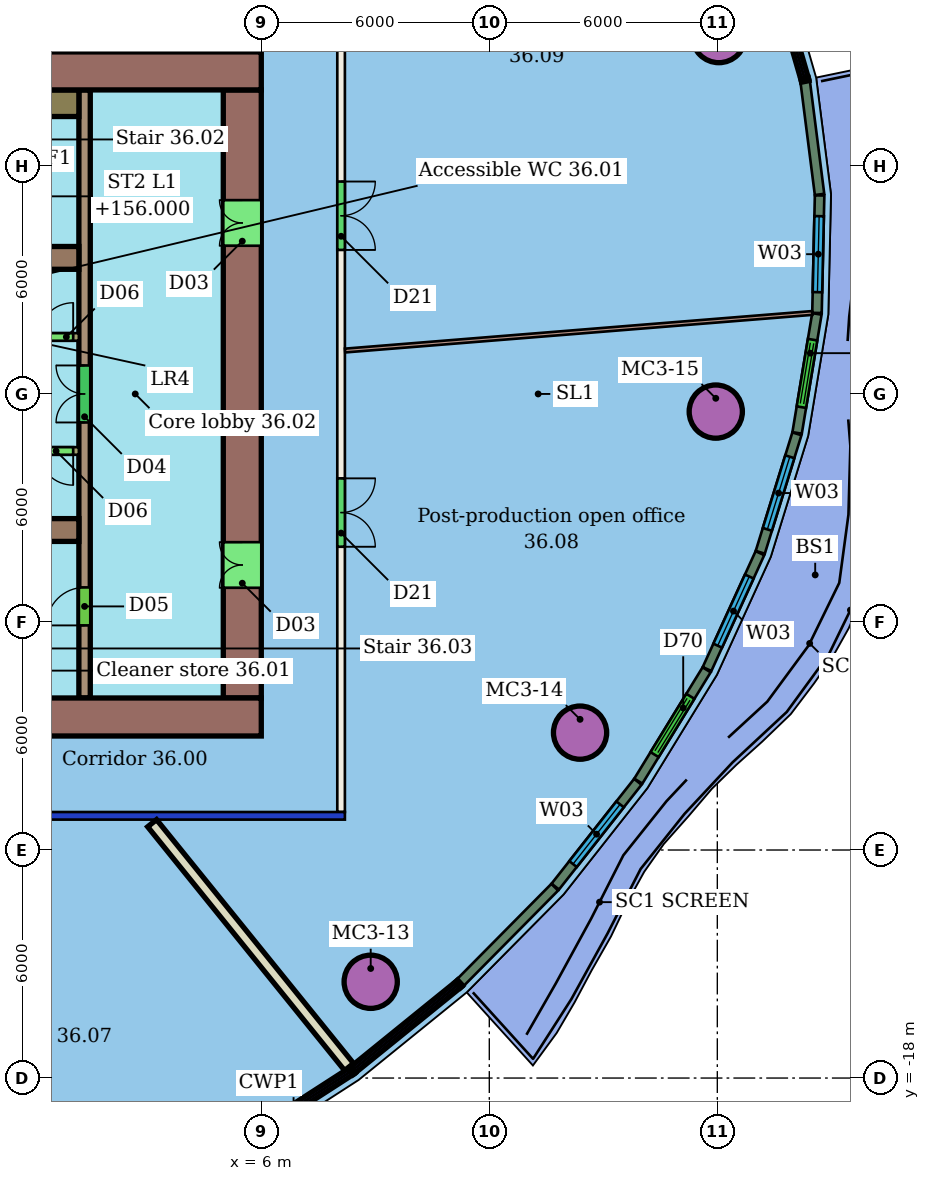
"""IFC4 building model, lengths in metres.
Left out: names, types, materials, properties, quantities, classifications, styles, units other than length and angle.
Written with IfcOpenShell. Run it as: python <this file> out.ifc"""

import sys

from ifc_helpers import new_model, si_unit, direction, frame, frame_2d, origin, origin_2d, place, context, subcontext, project, spatial, rectangle, hollow_circle, extrude, element, fill, save


model = new_model("IFC4")
c1 = context("Model", 3, precision=1e-05, world=origin(), true_north=direction((0.0, 1.0)))
c2 = subcontext(c1, "Body", "Model", "MODEL_VIEW")
j1 = project(units=[si_unit("LENGTHUNIT", "METRE"), si_unit("PLANEANGLEUNIT", "RADIAN")], contexts=[c1])
p1 = place(None, origin())
s1 = spatial("IfcSite", under=j1, at=p1, CompositionType="ELEMENT")
p2 = place(p1, origin())
s2 = spatial("IfcBuilding", under=s1, at=p2, CompositionType="ELEMENT")
p3 = place(p2, frame((0.0, 0.0, 154.2)))
s3 = spatial("IfcBuildingStorey", under=s2, at=p3, CompositionType="ELEMENT", Elevation=154.2)
for number, where, z_axis, x_axis in (
    (1, (8.879, -15.467, 0.0), (0.0, 0.0, 1.0), (1.0, 0.0, 0.0)),
    (2, (14.388, -8.912, 0.0), (0.0, 0.0, 1.0), (1.0, 0.0, 0.0)),
    (3, (17.959, -0.464, 0.0), (0.0, 0.0, 1.0), (1.0, 0.0, 0.0)),
    (4, (18.041, 9.417, 0.0), (0.0, 0.0, 1.0), (1.0, 0.0, 0.0)),
):
    element("IfcColumn", number, at=place(p3, frame(where, z_axis=z_axis, x_axis=x_axis)), inside=s3, PredefinedType="COLUMN", context=c2, shape_type="SweptSolid", body=[
        extrude(hollow_circle(Radius=0.7, WallThickness=0.05, at=origin_2d()), origin(), (0.0, 0.0, 1.0), 3.45),
    ])
p4 = place(p3, frame((8.2, -11.1, 0.0), z_axis=(0.0, 0.0, 1.0), x_axis=(-1.0, 0.0, 0.0)))
e5 = element("IfcWall", 5, at=p4, inside=s3, PredefinedType="PARTITIONING", context=c2, shape_type="SweptSolid", body=[
    extrude(rectangle(XDim=28.4, YDim=0.2, at=frame_2d((14.2, 0.0))), origin(), (0.0, 0.0, 1.0), 3.05),
])
p5 = place(p4, frame((17.611, 0.0, 0.0)))
e6 = element("IfcOpeningElement", 6, at=p5, cuts=e5, PredefinedType="OPENING", context=c2, shape_type="SweptSolid", body=[
    extrude(rectangle(XDim=1.8, YDim=2.4, at=frame_2d((0.9, 1.2))), frame((0.0, 0.11, 0.0), z_axis=(0.0, -1.0, 0.0), x_axis=(1.0, 0.0, 0.0)), (0.0, 0.0, 1.0), 0.22),
])
p6 = place(p4, frame((8.032, 0.0, 0.0)))
e7 = element("IfcOpeningElement", 7, at=p6, cuts=e5, PredefinedType="OPENING", context=c2, shape_type="SweptSolid", body=[
    extrude(rectangle(XDim=1.2, YDim=2.1, at=frame_2d((0.6, 1.05))), frame((0.0, 0.11, 0.0), z_axis=(0.0, -1.0, 0.0), x_axis=(1.0, 0.0, 0.0)), (0.0, 0.0, 1.0), 0.22),
])
p7 = place(p3, frame((8.1, 11.0, 0.0), z_axis=(0.0, 0.0, 1.0), x_axis=(0.0, -1.0, 0.0)))
e8 = element("IfcWall", 8, at=p7, inside=s3, PredefinedType="PARTITIONING", context=c2, shape_type="SweptSolid", body=[
    extrude(rectangle(XDim=22.0, YDim=0.2, at=frame_2d((11.0, 0.0))), origin(), (0.0, 0.0, 1.0), 3.45),
])
p8 = place(p7, frame((13.221, 0.0, 0.0)))
e9 = element("IfcOpeningElement", 9, at=p8, cuts=e8, PredefinedType="OPENING", context=c2, shape_type="SweptSolid", body=[
    extrude(rectangle(XDim=1.8, YDim=2.1, at=frame_2d((0.9, 1.05))), frame((0.0, 0.11, 0.0), z_axis=(0.0, -1.0, 0.0), x_axis=(1.0, 0.0, 0.0)), (0.0, 0.0, 1.0), 0.22),
])
p9 = place(p7, frame((5.411, 0.0, 0.0)))
e10 = element("IfcOpeningElement", 10, at=p9, cuts=e8, PredefinedType="OPENING", context=c2, shape_type="SweptSolid", body=[
    extrude(rectangle(XDim=1.8, YDim=2.1, at=frame_2d((0.9, 1.05))), frame((0.0, 0.11, 0.0), z_axis=(0.0, -1.0, 0.0), x_axis=(1.0, 0.0, 0.0)), (0.0, 0.0, 1.0), 0.22),
])
p10 = place(p3, frame((8.31, -17.708, 0.0), z_axis=(0.0, 0.0, 1.0), x_axis=(-0.628547282079, 0.777771376557, 0.0)))
e11 = element("IfcWall", 11, at=p10, inside=s3, PredefinedType="PARTITIONING", context=c2, shape_type="SweptSolid", body=[
    extrude(rectangle(XDim=8.246, YDim=0.3, at=frame_2d((4.123, 0.0))), origin(), (0.0, 0.0, 1.0), 3.45),
])
p11 = place(p3, frame((20.498, 2.131, 0.0), z_axis=(0.0, 0.0, 1.0), x_axis=(-0.996782781299, -0.080150401777, 0.0)))
e12 = element("IfcWall", 12, at=p11, inside=s3, PredefinedType="PARTITIONING", context=c2, shape_type="SweptSolid", body=[
    extrude(rectangle(XDim=12.333, YDim=0.1, at=frame_2d((6.167, 0.0))), origin(), (0.0, 0.0, 1.0), 3.45),
])
p12 = place(p3, frame((11.243, -15.484, 0.0), z_axis=(0.0, 0.0, 1.0), x_axis=(0.703320991983, 0.710872409253, 0.0)))
e13 = element("IfcWall", 13, at=p12, inside=s3, PredefinedType="SOLIDWALL", context=c2, shape_type="SweptSolid", body=[
    extrude(rectangle(XDim=3.524, YDim=0.25, at=frame_2d((1.762, 0.0))), origin(), (0.0, 0.0, 1.0), 3.1),
])
p13 = place(p3, frame((13.736, -12.962, 0.0), z_axis=(0.0, 0.0, 1.0), x_axis=(0.618917748118, 0.785455804654, 0.0)))
e14 = element("IfcWall", 14, at=p13, inside=s3, PredefinedType="SOLIDWALL", context=c2, shape_type="SweptSolid", body=[
    extrude(rectangle(XDim=3.51, YDim=0.25, at=frame_2d((1.755, 0.0))), origin(), (0.0, 0.0, 1.0), 3.1),
])
p14 = place(p13, frame((0.755, 0.0, 0.9)))
e15 = element("IfcOpeningElement", 15, at=p14, cuts=e14, PredefinedType="OPENING", context=c2, shape_type="SweptSolid", body=[
    extrude(rectangle(XDim=2.0, YDim=2.1, at=frame_2d((1.0, 1.05))), frame((0.0, 0.135, 0.0), z_axis=(0.0, -1.0, 0.0), x_axis=(1.0, 0.0, 0.0)), (0.0, 0.0, 1.0), 0.27),
])
p15 = place(p3, frame((15.921, -10.187, 0.0), z_axis=(0.0, 0.0, 1.0), x_axis=(0.52303850946, 0.852309050534, 0.0)))
e16 = element("IfcWall", 16, at=p15, inside=s3, PredefinedType="SOLIDWALL", context=c2, shape_type="SweptSolid", body=[
    extrude(rectangle(XDim=3.436, YDim=0.25, at=frame_2d((1.718, 0.0))), origin(), (0.0, 0.0, 1.0), 3.1),
])
p16 = place(p15, frame((0.818, 0.0, 0.0)))
e17 = element("IfcOpeningElement", 17, at=p16, cuts=e16, PredefinedType="OPENING", context=c2, shape_type="SweptSolid", body=[
    extrude(rectangle(XDim=1.8, YDim=2.4, at=frame_2d((0.9, 1.2))), frame((0.0, 0.135, 0.0), z_axis=(0.0, -1.0, 0.0), x_axis=(1.0, 0.0, 0.0)), (0.0, 0.0, 1.0), 0.27),
])
p17 = place(p3, frame((17.729, -7.238, 0.0), z_axis=(0.0, 0.0, 1.0), x_axis=(0.415294970102, 0.909686807537, 0.0)))
e18 = element("IfcWall", 18, at=p17, inside=s3, PredefinedType="SOLIDWALL", context=c2, shape_type="SweptSolid", body=[
    extrude(rectangle(XDim=3.352, YDim=0.25, at=frame_2d((1.676, 0.0))), origin(), (0.0, 0.0, 1.0), 3.1),
])
p18 = place(p17, frame((0.676, 0.0, 0.9)))
e19 = element("IfcOpeningElement", 19, at=p18, cuts=e18, PredefinedType="OPENING", context=c2, shape_type="SweptSolid", body=[
    extrude(rectangle(XDim=2.0, YDim=2.1, at=frame_2d((1.0, 1.05))), frame((0.0, 0.135, 0.0), z_axis=(0.0, -1.0, 0.0), x_axis=(1.0, 0.0, 0.0)), (0.0, 0.0, 1.0), 0.27),
])
p19 = place(p3, frame((19.13, -4.166, 0.0), z_axis=(0.0, 0.0, 1.0), x_axis=(0.295410582075, 0.955370393093, 0.0)))
e20 = element("IfcWall", 20, at=p19, inside=s3, PredefinedType="SOLIDWALL", context=c2, shape_type="SweptSolid", body=[
    extrude(rectangle(XDim=3.263, YDim=0.25, at=frame_2d((1.631, 0.0))), origin(), (0.0, 0.0, 1.0), 3.1),
])
p20 = place(p19, frame((0.631, 0.0, 0.9)))
e21 = element("IfcOpeningElement", 21, at=p20, cuts=e20, PredefinedType="OPENING", context=c2, shape_type="SweptSolid", body=[
    extrude(rectangle(XDim=2.0, YDim=2.1, at=frame_2d((1.0, 1.05))), frame((0.0, 0.135, 0.0), z_axis=(0.0, -1.0, 0.0), x_axis=(1.0, 0.0, 0.0)), (0.0, 0.0, 1.0), 0.27),
])
p21 = place(p3, frame((20.1, -1.025, 0.0), z_axis=(0.0, 0.0, 1.0), x_axis=(0.163912512181, 0.986474879736, 0.0)))
e22 = element("IfcWall", 22, at=p21, inside=s3, PredefinedType="SOLIDWALL", context=c2, shape_type="SweptSolid", body=[
    extrude(rectangle(XDim=3.174, YDim=0.25, at=frame_2d((1.587, 0.0))), origin(), (0.0, 0.0, 1.0), 3.1),
])
p22 = place(p21, frame((0.687, 0.0, 0.0)))
e23 = element("IfcOpeningElement", 23, at=p22, cuts=e22, PredefinedType="OPENING", context=c2, shape_type="SweptSolid", body=[
    extrude(rectangle(XDim=1.8, YDim=2.4, at=frame_2d((0.9, 1.2))), frame((0.0, 0.135, 0.0), z_axis=(0.0, -1.0, 0.0), x_axis=(1.0, 0.0, 0.0)), (0.0, 0.0, 1.0), 0.27),
])
p23 = place(p3, frame((20.623, 2.132, 0.0), z_axis=(0.0, 0.0, 1.0), x_axis=(0.022342995581, 0.999750364115, 0.0)))
e24 = element("IfcWall", 24, at=p23, inside=s3, PredefinedType="SOLIDWALL", context=c2, shape_type="SweptSolid", body=[
    extrude(rectangle(XDim=3.092, YDim=0.25, at=frame_2d((1.546, 0.0))), origin(), (0.0, 0.0, 1.0), 3.1),
])
p24 = place(p23, frame((0.546, 0.0, 0.9)))
e25 = element("IfcOpeningElement", 25, at=p24, cuts=e24, PredefinedType="OPENING", context=c2, shape_type="SweptSolid", body=[
    extrude(rectangle(XDim=2.0, YDim=2.1, at=frame_2d((1.0, 1.05))), frame((0.0, 0.135, 0.0), z_axis=(0.0, -1.0, 0.0), x_axis=(1.0, 0.0, 0.0)), (0.0, 0.0, 1.0), 0.27),
])
p25 = place(p3, frame((20.69, 5.25, 0.0), z_axis=(0.0, 0.0, 1.0), x_axis=(-0.1263011447, 0.991991945959, 0.0)))
e26 = element("IfcWall", 26, at=p25, inside=s3, PredefinedType="SOLIDWALL", context=c2, shape_type="SweptSolid", body=[
    extrude(rectangle(XDim=2.983, YDim=0.25, at=frame_2d((1.491, 0.0))), origin(), (0.0, 0.0, 1.0), 3.1),
])
p26 = place(p3, frame((6.0, 8.5, 0.0), z_axis=(0.0, 0.0, 1.0), x_axis=(-1.0, 0.0, 0.0)))
e27 = element("IfcWall", 27, at=p26, inside=s3, PredefinedType="SHEAR", context=c2, shape_type="SweptSolid", body=[
    extrude(rectangle(XDim=12.0, YDim=1.0, at=frame_2d((6.0, 0.0))), origin(), (0.0, 0.0, 1.0), 3.3),
])
p27 = place(p26, frame((5.6, 0.0, 0.0)))
e28 = element("IfcOpeningElement", 28, at=p27, cuts=e27, PredefinedType="OPENING", context=c2, shape_type="SweptSolid", body=[
    extrude(rectangle(XDim=1.2, YDim=2.1, at=frame_2d((0.6, 1.05))), frame((0.0, 0.51, 0.0), z_axis=(0.0, -1.0, 0.0), x_axis=(1.0, 0.0, 0.0)), (0.0, 0.0, 1.0), 1.02),
])
p28 = place(p3, frame((-18.0, -8.5, 0.0), z_axis=(0.0, 0.0, 1.0), x_axis=(1.0, 0.0, 0.0)))
e29 = element("IfcWall", 29, at=p28, inside=s3, PredefinedType="SHEAR", context=c2, shape_type="SweptSolid", body=[
    extrude(rectangle(XDim=24.0, YDim=1.0, at=frame_2d((12.0, 0.0))), origin(), (0.0, 0.0, 1.0), 3.3),
])
p29 = place(p28, frame((6.0, 0.0, 0.0)))
e30 = element("IfcOpeningElement", 30, at=p29, cuts=e29, PredefinedType="OPENING", context=c2, shape_type="SweptSolid", body=[
    extrude(rectangle(XDim=1.2, YDim=2.1, at=frame_2d((0.6, 1.05))), frame((0.0, 0.51, 0.0), z_axis=(0.0, -1.0, 0.0), x_axis=(1.0, 0.0, 0.0)), (0.0, 0.0, 1.0), 1.02),
])
p30 = place(p3, frame((5.5, -8.0, 0.0), z_axis=(0.0, 0.0, 1.0), x_axis=(0.0, 1.0, 0.0)))
e31 = element("IfcWall", 31, at=p30, inside=s3, PredefinedType="SHEAR", context=c2, shape_type="SweptSolid", body=[
    extrude(rectangle(XDim=16.0, YDim=1.0, at=frame_2d((8.0, 0.0))), origin(), (0.0, 0.0, 1.0), 3.3),
])
p31 = place(p30, frame((2.9, 0.0, 0.0)))
e32 = element("IfcOpeningElement", 32, at=p31, cuts=e31, PredefinedType="OPENING", context=c2, shape_type="SweptSolid", body=[
    extrude(rectangle(XDim=1.2, YDim=2.1, at=frame_2d((0.6, 1.05))), frame((0.0, 0.51, 0.0), z_axis=(0.0, -1.0, 0.0), x_axis=(1.0, 0.0, 0.0)), (0.0, 0.0, 1.0), 1.02),
])
p32 = place(p30, frame((11.9, 0.0, 0.0)))
e33 = element("IfcOpeningElement", 33, at=p32, cuts=e31, PredefinedType="OPENING", context=c2, shape_type="SweptSolid", body=[
    extrude(rectangle(XDim=1.2, YDim=2.1, at=frame_2d((0.6, 1.05))), frame((0.0, 0.51, 0.0), z_axis=(0.0, -1.0, 0.0), x_axis=(1.0, 0.0, 0.0)), (0.0, 0.0, 1.0), 1.02),
])
for number, where, z_axis, x_axis in (
    (34, (-6.0, 3.58, 0.0), (0.0, 0.0, 1.0), (1.0, 0.0, 0.0)),
    (35, (-6.0, -3.58, 0.0), (0.0, 0.0, 1.0), (1.0, 0.0, 0.0)),
):
    element("IfcWall", number, at=place(p3, frame(where, z_axis=z_axis, x_axis=x_axis)), inside=s3, PredefinedType="SHEAR", context=c2, shape_type="SweptSolid", body=[
        extrude(rectangle(XDim=7.2, YDim=0.6, at=frame_2d((3.6, 0.0))), origin(), (0.0, 0.0, 1.0), 3.3),
    ])
p33 = place(p3, frame((1.35, -8.0, 0.0), z_axis=(0.0, 0.0, 1.0), x_axis=(0.0, 1.0, 0.0)))
e36 = element("IfcWall", 36, at=p33, inside=s3, PredefinedType="SHEAR", context=c2, shape_type="SweptSolid", body=[
    extrude(rectangle(XDim=16.0, YDim=0.3, at=frame_2d((8.0, 0.0))), origin(), (0.0, 0.0, 1.0), 3.3),
])
p34 = place(p33, frame((1.91, 0.0, 0.0)))
e37 = element("IfcOpeningElement", 37, at=p34, cuts=e36, PredefinedType="OPENING", context=c2, shape_type="SweptSolid", body=[
    extrude(rectangle(XDim=1.0, YDim=2.1, at=frame_2d((0.5, 1.05))), frame((0.0, 0.16, 0.0), z_axis=(0.0, -1.0, 0.0), x_axis=(1.0, 0.0, 0.0)), (0.0, 0.0, 1.0), 0.32),
])
p35 = place(p33, frame((7.25, 0.0, 0.0)))
e38 = element("IfcOpeningElement", 38, at=p35, cuts=e36, PredefinedType="OPENING", context=c2, shape_type="SweptSolid", body=[
    extrude(rectangle(XDim=1.5, YDim=2.1, at=frame_2d((0.75, 1.05))), frame((0.0, 0.16, 0.0), z_axis=(0.0, -1.0, 0.0), x_axis=(1.0, 0.0, 0.0)), (0.0, 0.0, 1.0), 0.32),
])
p36 = place(p3, frame((-13.2, 1.5, 0.0), z_axis=(0.0, 0.0, 1.0), x_axis=(1.0, 0.0, 0.0)))
e39 = element("IfcWall", 39, at=p36, inside=s3, PredefinedType="SHEAR", context=c2, shape_type="SweptSolid", body=[
    extrude(rectangle(XDim=14.4, YDim=0.2, at=frame_2d((7.2, 0.0))), origin(), (0.0, 0.0, 1.0), 3.3),
])
p37 = place(p36, frame((0.546, 0.0, 0.0)))
e40 = element("IfcOpeningElement", 40, at=p37, cuts=e39, PredefinedType="OPENING", context=c2, shape_type="SweptSolid", body=[
    extrude(rectangle(XDim=1.1, YDim=2.1, at=frame_2d((0.55, 1.05))), frame((0.0, 0.11, 0.0), z_axis=(0.0, -1.0, 0.0), x_axis=(1.0, 0.0, 0.0)), (0.0, 0.0, 1.0), 0.22),
])
p38 = place(p36, frame((2.988, 0.0, 0.0)))
e41 = element("IfcOpeningElement", 41, at=p38, cuts=e39, PredefinedType="OPENING", context=c2, shape_type="SweptSolid", body=[
    extrude(rectangle(XDim=1.1, YDim=2.1, at=frame_2d((0.55, 1.05))), frame((0.0, 0.11, 0.0), z_axis=(0.0, -1.0, 0.0), x_axis=(1.0, 0.0, 0.0)), (0.0, 0.0, 1.0), 0.22),
])
p39 = place(p36, frame((5.429, 0.0, 0.0)))
e42 = element("IfcOpeningElement", 42, at=p39, cuts=e39, PredefinedType="OPENING", context=c2, shape_type="SweptSolid", body=[
    extrude(rectangle(XDim=1.1, YDim=2.1, at=frame_2d((0.55, 1.05))), frame((0.0, 0.11, 0.0), z_axis=(0.0, -1.0, 0.0), x_axis=(1.0, 0.0, 0.0)), (0.0, 0.0, 1.0), 0.22),
])
p40 = place(p36, frame((7.871, 0.0, 0.0)))
e43 = element("IfcOpeningElement", 43, at=p40, cuts=e39, PredefinedType="OPENING", context=c2, shape_type="SweptSolid", body=[
    extrude(rectangle(XDim=1.1, YDim=2.1, at=frame_2d((0.55, 1.05))), frame((0.0, 0.11, 0.0), z_axis=(0.0, -1.0, 0.0), x_axis=(1.0, 0.0, 0.0)), (0.0, 0.0, 1.0), 0.22),
])
p41 = place(p36, frame((10.21, 0.0, 0.0)))
e44 = element("IfcOpeningElement", 44, at=p41, cuts=e39, PredefinedType="OPENING", context=c2, shape_type="SweptSolid", body=[
    extrude(rectangle(XDim=1.0, YDim=2.1, at=frame_2d((0.5, 1.05))), frame((0.0, 0.11, 0.0), z_axis=(0.0, -1.0, 0.0), x_axis=(1.0, 0.0, 0.0)), (0.0, 0.0, 1.0), 0.22),
])
p42 = place(p36, frame((13.35, 0.0, 0.0)))
e45 = element("IfcOpeningElement", 45, at=p42, cuts=e39, PredefinedType="OPENING", context=c2, shape_type="SweptSolid", body=[
    extrude(rectangle(XDim=0.9, YDim=2.1, at=frame_2d((0.45, 1.05))), frame((0.0, 0.11, 0.0), z_axis=(0.0, -1.0, 0.0), x_axis=(1.0, 0.0, 0.0)), (0.0, 0.0, 1.0), 0.22),
])
p43 = place(p3, frame((1.2, -1.5, 0.0), z_axis=(0.0, 0.0, 1.0), x_axis=(-1.0, 0.0, 0.0)))
e46 = element("IfcWall", 46, at=p43, inside=s3, PredefinedType="SHEAR", context=c2, shape_type="SweptSolid", body=[
    extrude(rectangle(XDim=14.4, YDim=0.2, at=frame_2d((7.2, 0.0))), origin(), (0.0, 0.0, 1.0), 3.3),
])
p44 = place(p43, frame((7.821, 0.0, 0.0)))
e47 = element("IfcOpeningElement", 47, at=p44, cuts=e46, PredefinedType="OPENING", context=c2, shape_type="SweptSolid", body=[
    extrude(rectangle(XDim=1.2, YDim=2.1, at=frame_2d((0.6, 1.05))), frame((0.0, 0.11, 0.0), z_axis=(0.0, -1.0, 0.0), x_axis=(1.0, 0.0, 0.0)), (0.0, 0.0, 1.0), 0.22),
])
p45 = place(p43, frame((0.15, 0.0, 0.0)))
e48 = element("IfcOpeningElement", 48, at=p45, cuts=e46, PredefinedType="OPENING", context=c2, shape_type="SweptSolid", body=[
    extrude(rectangle(XDim=0.9, YDim=2.1, at=frame_2d((0.45, 1.05))), frame((0.0, 0.11, 0.0), z_axis=(0.0, -1.0, 0.0), x_axis=(1.0, 0.0, 0.0)), (0.0, 0.0, 1.0), 0.22),
])
p46 = place(p3, frame((0.4, 7.65, 0.0), z_axis=(0.0, 0.0, 1.0), x_axis=(1.0, 0.0, 0.0)))
e49 = element("IfcWall", 49, at=p46, inside=s3, PredefinedType="SHEAR", context=c2, shape_type="SweptSolid", body=[
    extrude(rectangle(XDim=0.8, YDim=0.7, at=frame_2d((0.4, 0.0))), origin(), (0.0, 0.0, 1.0), 3.3),
])
p47 = place(p8, origin())
e50 = element("IfcDoor", 50, at=p47, inside=s3, OperationType="DOUBLE_DOOR_SINGLE_SWING", PredefinedType="DOOR", context=c2, shape_type="SweptSolid", body=[
    extrude(rectangle(XDim=1.8, YDim=2.1, at=frame_2d((0.9, 1.05))), frame((0.0, 0.025, 0.0), z_axis=(0.0, -1.0, 0.0), x_axis=(1.0, 0.0, 0.0)), (0.0, 0.0, 1.0), 0.05),
])
fill(e9, e50)
p48 = place(p9, origin())
e51 = element("IfcDoor", 51, at=p48, inside=s3, OperationType="DOUBLE_DOOR_SINGLE_SWING", PredefinedType="DOOR", context=c2, shape_type="SweptSolid", body=[
    extrude(rectangle(XDim=1.8, YDim=2.1, at=frame_2d((0.9, 1.05))), frame((0.0, 0.025, 0.0), z_axis=(0.0, -1.0, 0.0), x_axis=(1.0, 0.0, 0.0)), (0.0, 0.0, 1.0), 0.05),
])
fill(e10, e51)
p49 = place(p14, origin())
e52 = element("IfcWindow", 52, at=p49, inside=s3, PartitioningType="SINGLE_PANEL", PredefinedType="WINDOW", context=c2, shape_type="SweptSolid", body=[
    extrude(rectangle(XDim=2.0, YDim=2.1, at=frame_2d((1.0, 1.05))), frame((0.0, 0.03, 0.0), z_axis=(0.0, -1.0, 0.0), x_axis=(1.0, 0.0, 0.0)), (0.0, 0.0, 1.0), 0.06),
])
fill(e15, e52)
p50 = place(p16, origin())
e53 = element("IfcDoor", 53, at=p50, inside=s3, OperationType="DOUBLE_DOOR_SLIDING", PredefinedType="DOOR", context=c2, shape_type="SweptSolid", body=[
    extrude(rectangle(XDim=1.8, YDim=2.4, at=frame_2d((0.9, 1.2))), frame((0.0, 0.025, 0.0), z_axis=(0.0, -1.0, 0.0), x_axis=(1.0, 0.0, 0.0)), (0.0, 0.0, 1.0), 0.05),
])
fill(e17, e53)
p51 = place(p18, origin())
e54 = element("IfcWindow", 54, at=p51, inside=s3, PartitioningType="SINGLE_PANEL", PredefinedType="WINDOW", context=c2, shape_type="SweptSolid", body=[
    extrude(rectangle(XDim=2.0, YDim=2.1, at=frame_2d((1.0, 1.05))), frame((0.0, 0.03, 0.0), z_axis=(0.0, -1.0, 0.0), x_axis=(1.0, 0.0, 0.0)), (0.0, 0.0, 1.0), 0.06),
])
fill(e19, e54)
p52 = place(p20, origin())
e55 = element("IfcWindow", 55, at=p52, inside=s3, PartitioningType="SINGLE_PANEL", PredefinedType="WINDOW", context=c2, shape_type="SweptSolid", body=[
    extrude(rectangle(XDim=2.0, YDim=2.1, at=frame_2d((1.0, 1.05))), frame((0.0, 0.03, 0.0), z_axis=(0.0, -1.0, 0.0), x_axis=(1.0, 0.0, 0.0)), (0.0, 0.0, 1.0), 0.06),
])
fill(e21, e55)
p53 = place(p22, origin())
e56 = element("IfcDoor", 56, at=p53, inside=s3, OperationType="DOUBLE_DOOR_SLIDING", PredefinedType="DOOR", context=c2, shape_type="SweptSolid", body=[
    extrude(rectangle(XDim=1.8, YDim=2.4, at=frame_2d((0.9, 1.2))), frame((0.0, 0.025, 0.0), z_axis=(0.0, -1.0, 0.0), x_axis=(1.0, 0.0, 0.0)), (0.0, 0.0, 1.0), 0.05),
])
fill(e23, e56)
p54 = place(p24, origin())
e57 = element("IfcWindow", 57, at=p54, inside=s3, PartitioningType="SINGLE_PANEL", PredefinedType="WINDOW", context=c2, shape_type="SweptSolid", body=[
    extrude(rectangle(XDim=2.0, YDim=2.1, at=frame_2d((1.0, 1.05))), frame((0.0, 0.03, 0.0), z_axis=(0.0, -1.0, 0.0), x_axis=(1.0, 0.0, 0.0)), (0.0, 0.0, 1.0), 0.06),
])
fill(e25, e57)
p55 = place(p31, origin())
e58 = element("IfcDoor", 58, at=p55, inside=s3, OperationType="DOUBLE_DOOR_SINGLE_SWING", PredefinedType="NOTDEFINED", context=c2, shape_type="SweptSolid", body=[
    extrude(rectangle(XDim=1.2, YDim=2.1, at=frame_2d((0.6, 1.05))), frame((0.0, 0.025, 0.0), z_axis=(0.0, -1.0, 0.0), x_axis=(1.0, 0.0, 0.0)), (0.0, 0.0, 1.0), 0.05),
])
fill(e32, e58)
p56 = place(p32, origin())
e59 = element("IfcDoor", 59, at=p56, inside=s3, OperationType="DOUBLE_DOOR_SINGLE_SWING", PredefinedType="NOTDEFINED", context=c2, shape_type="SweptSolid", body=[
    extrude(rectangle(XDim=1.2, YDim=2.1, at=frame_2d((0.6, 1.05))), frame((0.0, 0.025, 0.0), z_axis=(0.0, -1.0, 0.0), x_axis=(1.0, 0.0, 0.0)), (0.0, 0.0, 1.0), 0.05),
])
fill(e33, e59)
p57 = place(p34, origin())
e60 = element("IfcDoor", 60, at=p57, inside=s3, OperationType="SINGLE_SWING_LEFT", PredefinedType="NOTDEFINED", context=c2, shape_type="SweptSolid", body=[
    extrude(rectangle(XDim=1.0, YDim=2.1, at=frame_2d((0.5, 1.05))), frame((0.0, 0.025, 0.0), z_axis=(0.0, -1.0, 0.0), x_axis=(1.0, 0.0, 0.0)), (0.0, 0.0, 1.0), 0.05),
])
fill(e37, e60)
p58 = place(p35, origin())
e61 = element("IfcDoor", 61, at=p58, inside=s3, OperationType="DOUBLE_DOOR_SINGLE_SWING", PredefinedType="NOTDEFINED", context=c2, shape_type="SweptSolid", body=[
    extrude(rectangle(XDim=1.5, YDim=2.1, at=frame_2d((0.75, 1.05))), frame((0.0, 0.025, 0.0), z_axis=(0.0, -1.0, 0.0), x_axis=(1.0, 0.0, 0.0)), (0.0, 0.0, 1.0), 0.05),
])
fill(e38, e61)
p59 = place(p42, origin())
e62 = element("IfcDoor", 62, at=p59, inside=s3, OperationType="SINGLE_SWING_RIGHT", PredefinedType="NOTDEFINED", context=c2, shape_type="SweptSolid", body=[
    extrude(rectangle(XDim=0.9, YDim=2.1, at=frame_2d((0.45, 1.05))), frame((0.0, 0.025, 0.0), z_axis=(0.0, -1.0, 0.0), x_axis=(1.0, 0.0, 0.0)), (0.0, 0.0, 1.0), 0.05),
])
fill(e45, e62)
p60 = place(p45, origin())
e63 = element("IfcDoor", 63, at=p60, inside=s3, OperationType="SINGLE_SWING_LEFT", PredefinedType="NOTDEFINED", context=c2, shape_type="SweptSolid", body=[
    extrude(rectangle(XDim=0.9, YDim=2.1, at=frame_2d((0.45, 1.05))), frame((0.0, 0.025, 0.0), z_axis=(0.0, -1.0, 0.0), x_axis=(1.0, 0.0, 0.0)), (0.0, 0.0, 1.0), 0.05),
])
fill(e48, e63)
save(model, sys.argv[1])
